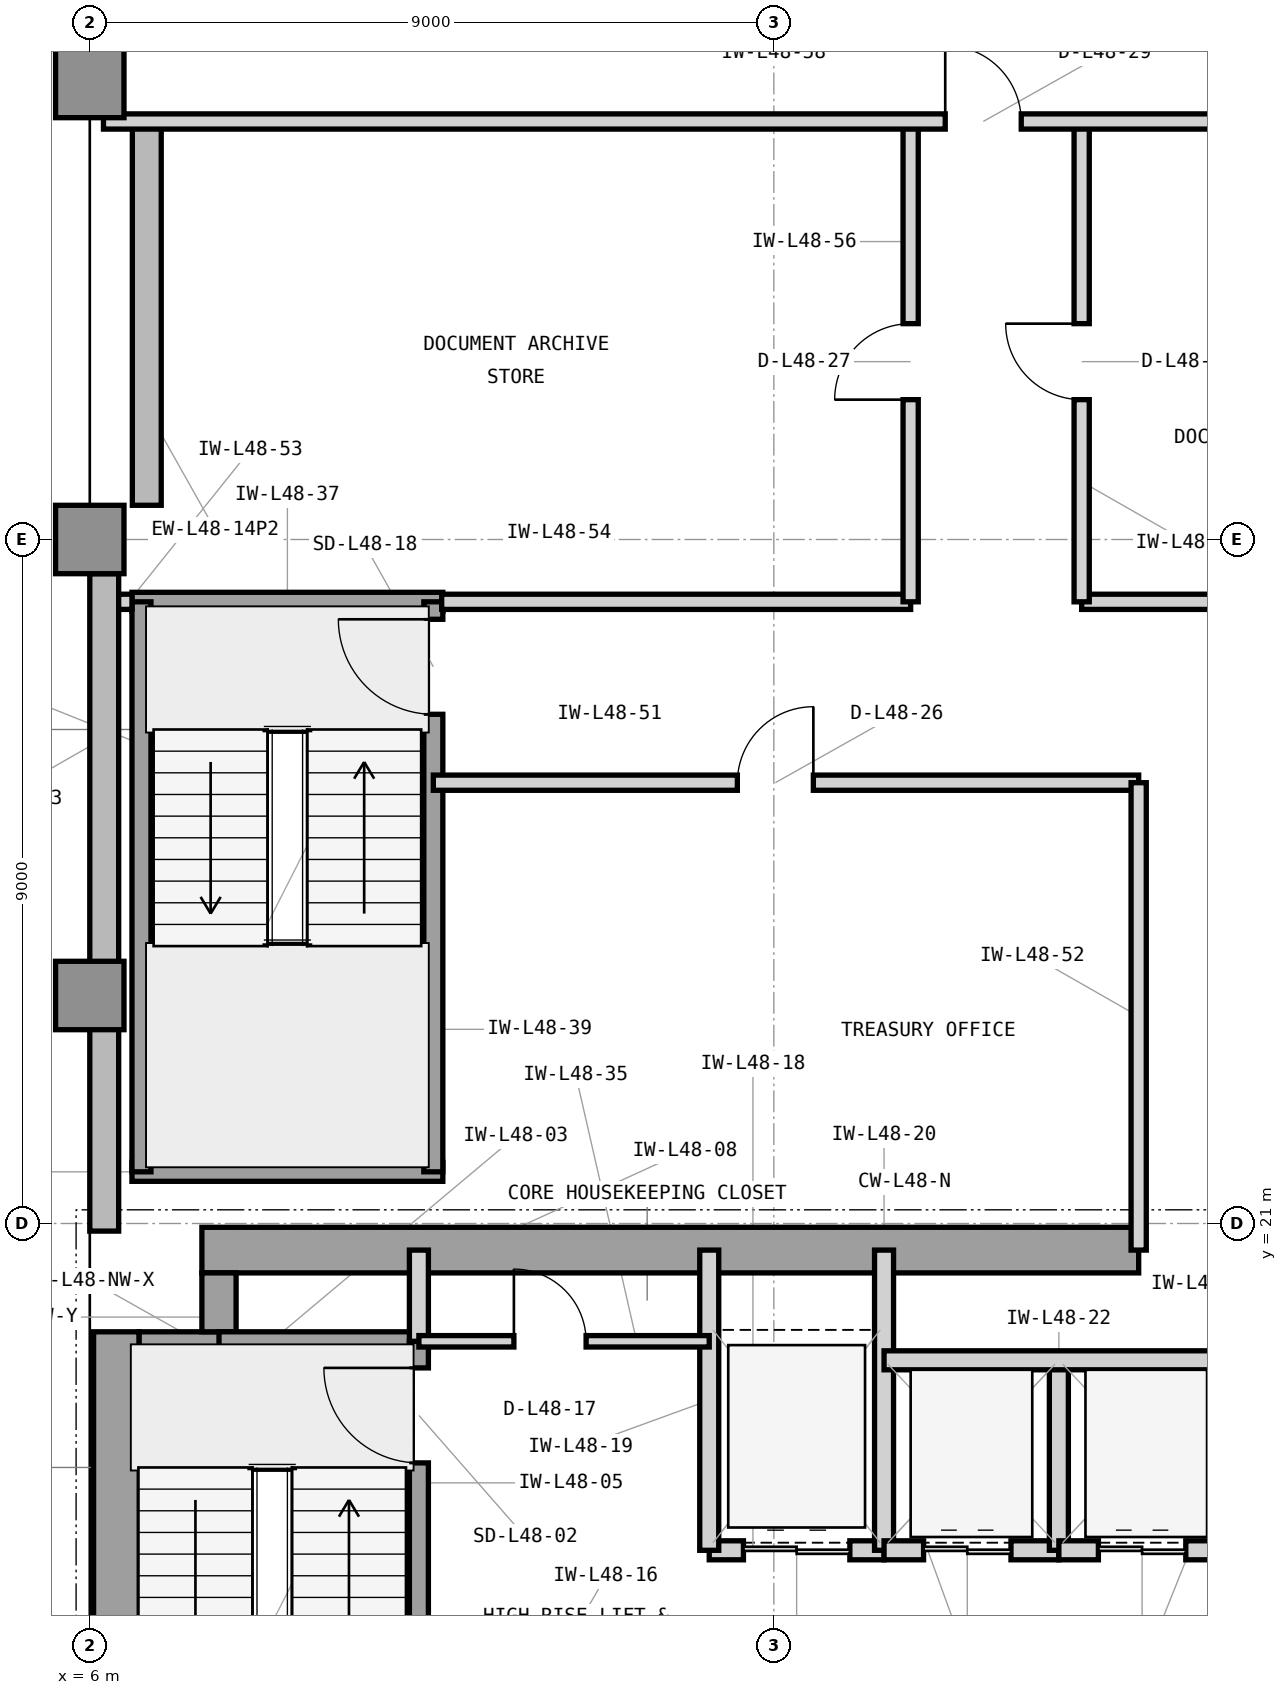
"""IFC4 building model, lengths in metres.
Left out: names, types, materials, properties, quantities, classifications, styles, units other than length and angle.
Written with IfcOpenShell. Run it as: python <this file> out.ifc"""

import sys

from ifc_helpers import new_model, si_unit, direction, frame, frame_2d, origin, origin_2d, place, context, subcontext, project, spatial, rectangle, extrude, element, fill, save


model = new_model("IFC4")
c1 = context("Model", 3, precision=1e-05, world=origin(), true_north=direction((0.0, 1.0)))
c2 = subcontext(c1, "Body", "Model", "MODEL_VIEW")
j1 = project(units=[si_unit("LENGTHUNIT", "METRE"), si_unit("PLANEANGLEUNIT", "RADIAN")], contexts=[c1])
p1 = place(None, origin())
s1 = spatial("IfcSite", under=j1, at=p1, CompositionType="ELEMENT")
p2 = place(p1, origin())
s2 = spatial("IfcBuilding", under=s1, at=p2, CompositionType="ELEMENT")
p3 = place(p2, frame((0.0, 0.0, 199.5)))
s3 = spatial("IfcBuildingStorey", under=s2, at=p3, CompositionType="ELEMENT", Elevation=199.5)
p4 = place(p3, frame((6.35, 4.425, 0.0), z_axis=(0.0, 0.0, 1.0), x_axis=(0.0, 1.0, 0.0)))
e1 = element("IfcWall", 1, at=p4, inside=s3, PredefinedType="SHEAR", context=c2, shape_type="SweptSolid", body=[
    extrude(rectangle(XDim=15.15, YDim=0.6, at=frame_2d((7.575, 0.0))), origin(), (0.0, 0.0, 1.0), 3.9),
])
p5 = place(p3, frame((7.475, 20.65, 0.0), z_axis=(0.0, 0.0, 1.0), x_axis=(1.0, 0.0, 0.0)))
e2 = element("IfcWall", 2, at=p5, inside=s3, PredefinedType="SHEAR", context=c2, shape_type="SweptSolid", body=[
    extrude(rectangle(XDim=12.325, YDim=0.6, at=frame_2d((6.163, 0.0))), origin(), (0.0, 0.0, 1.0), 3.9),
])
p6 = place(p3, frame((6.65, 19.35, 0.0), z_axis=(0.0, 0.0, 1.0), x_axis=(1.0, 0.0, 0.0)))
e3 = element("IfcWall", 3, at=p6, inside=s3, PredefinedType="SHEAR", context=c2, shape_type="SweptSolid", body=[
    extrude(rectangle(XDim=1.275, YDim=0.45, at=frame_2d((0.638, 0.0))), origin(), (0.0, 0.0, 1.0), 3.9),
])
p7 = place(p3, frame((7.7, 19.575, 0.0), z_axis=(0.0, 0.0, 1.0), x_axis=(0.0, 1.0, 0.0)))
e4 = element("IfcWall", 4, at=p7, inside=s3, PredefinedType="SHEAR", context=c2, shape_type="SweptSolid", body=[
    extrude(rectangle(XDim=0.775, YDim=0.45, at=frame_2d((0.388, 0.0))), origin(), (0.0, 0.0, 1.0), 3.9),
])
for number, where, z_axis, x_axis in (
    (5, (6.0, 24.0, 0.0), (0.0, 0.0, 1.0), (1.0, 0.0, 0.0)),
    (6, (6.0, 30.0, 0.0), (0.0, 0.0, 1.0), (1.0, 0.0, 0.0)),
    (7, (6.0, 36.0, 0.0), (0.0, 0.0, 1.0), (1.0, 0.0, 0.0)),
):
    element("IfcColumn", number, at=place(p3, frame(where, z_axis=z_axis, x_axis=x_axis)), inside=s3, PredefinedType="COLUMN", context=c2, shape_type="SweptSolid", body=[
        extrude(rectangle(XDim=0.9, YDim=0.9, at=origin_2d()), origin(), (0.0, 0.0, 1.0), 3.9),
    ])
p8 = place(p3, frame((6.75, 35.55, 0.0), z_axis=(0.0, 0.0, 1.0), x_axis=(0.0, -1.0, 0.0)))
e8 = element("IfcWall", 8, at=p8, inside=s3, PredefinedType="STANDARD", context=c2, shape_type="SweptSolid", body=[
    extrude(rectangle(XDim=5.1, YDim=0.38, at=frame_2d((2.55, 0.0))), origin(), (0.0, 0.0, 1.0), 3.7),
])
p9 = place(p3, frame((6.19, 29.55, 0.0), z_axis=(0.0, 0.0, 1.0), x_axis=(0.0, -1.0, 0.0)))
e9 = element("IfcWall", 9, at=p9, inside=s3, PredefinedType="STANDARD", context=c2, shape_type="SweptSolid", body=[
    extrude(rectangle(XDim=8.65, YDim=0.38, at=frame_2d((4.325, 0.0))), origin(), (0.0, 0.0, 1.0), 3.7),
])
p10 = place(p3, frame((7.7, 19.45, 0.0), z_axis=(0.0, 0.0, 1.0), x_axis=(1.0, 0.0, 0.0)))
e10 = element("IfcWall", 10, at=p10, inside=s3, PredefinedType="SHEAR", context=c2, shape_type="SweptSolid", body=[
    extrude(rectangle(XDim=2.755, YDim=0.25, at=frame_2d((1.377, 0.0))), origin(), (0.0, 0.0, 1.0), 3.9),
])
p11 = place(p3, frame((10.33, 12.0, 0.0), z_axis=(0.0, 0.0, 1.0), x_axis=(0.0, 1.0, 0.0)))
e11 = element("IfcWall", 11, at=p11, inside=s3, PredefinedType="SHEAR", context=c2, shape_type="SweptSolid", body=[
    extrude(rectangle(XDim=7.45, YDim=0.25, at=frame_2d((3.725, 0.0))), origin(), (0.0, 0.0, 1.0), 3.9),
])
p12 = place(p11, frame((5.85, 0.0, 0.0)))
e12 = element("IfcOpeningElement", 12, at=p12, cuts=e11, PredefinedType="OPENING", context=c2, shape_type="SweptSolid", body=[
    extrude(rectangle(XDim=1.25, YDim=2.2, at=frame_2d((0.625, 1.1))), frame((0.0, 0.135, 0.0), z_axis=(0.0, -1.0, 0.0), x_axis=(1.0, 0.0, 0.0)), (0.0, 0.0, 1.0), 0.27),
])
p13 = place(p3, frame((10.33, 19.45, 0.0), z_axis=(0.0, 0.0, 1.0), x_axis=(0.0, 1.0, 0.0)))
e13 = element("IfcWall", 13, at=p13, inside=s3, PredefinedType="PARTITIONING", context=c2, shape_type="SweptSolid", body=[
    extrude(rectangle(XDim=1.2, YDim=0.25, at=frame_2d((0.6, 0.0))), origin(), (0.0, 0.0, 1.0), 3.69),
])
p14 = place(p3, frame((14.15, 16.7, 0.0), z_axis=(0.0, 0.0, 1.0), x_axis=(1.0, 0.0, 0.0)))
e14 = element("IfcWall", 14, at=p14, inside=s3, PredefinedType="PARTITIONING", context=c2, shape_type="SweptSolid", body=[
    extrude(rectangle(XDim=2.3, YDim=0.25, at=frame_2d((1.15, 0.0))), origin(), (0.0, 0.0, 1.0), 3.283),
])
p15 = place(p14, frame((0.45, 0.0, 0.0)))
e15 = element("IfcOpeningElement", 15, at=p15, cuts=e14, PredefinedType="OPENING", context=c2, shape_type="SweptSolid", body=[
    extrude(rectangle(XDim=1.4, YDim=2.35, at=frame_2d((0.7, 1.175))), frame((0.0, 0.135, 0.0), z_axis=(0.0, -1.0, 0.0), x_axis=(1.0, 0.0, 0.0)), (0.0, 0.0, 1.0), 0.27),
])
for number, where, z_axis, x_axis in (
    (16, (14.15, 16.7, 0.0), (0.0, 0.0, 1.0), (0.0, 1.0, 0.0)),
    (17, (16.45, 16.7, 0.0), (0.0, 0.0, 1.0), (0.0, 1.0, 0.0)),
):
    element("IfcWall", number, at=place(p3, frame(where, z_axis=z_axis, x_axis=x_axis)), inside=s3, PredefinedType="PARTITIONING", context=c2, shape_type="SweptSolid", body=[
        extrude(rectangle(XDim=3.95, YDim=0.25, at=frame_2d((1.975, 0.0))), origin(), (0.0, 0.0, 1.0), 3.69),
    ])
p16 = place(p3, frame((16.45, 16.7, 0.0), z_axis=(0.0, 0.0, 1.0), x_axis=(1.0, 0.0, 0.0)))
e18 = element("IfcWall", 18, at=p16, inside=s3, PredefinedType="PARTITIONING", context=c2, shape_type="SweptSolid", body=[
    extrude(rectangle(XDim=2.3, YDim=0.25, at=frame_2d((1.15, 0.0))), origin(), (0.0, 0.0, 1.0), 3.283),
])
p17 = place(p16, frame((0.52, 0.0, 0.0)))
e19 = element("IfcOpeningElement", 19, at=p17, cuts=e18, PredefinedType="OPENING", context=c2, shape_type="SweptSolid", body=[
    extrude(rectangle(XDim=1.15, YDim=2.25, at=frame_2d((0.575, 1.125))), frame((0.0, 0.135, 0.0), z_axis=(0.0, -1.0, 0.0), x_axis=(1.0, 0.0, 0.0)), (0.0, 0.0, 1.0), 0.27),
])
p18 = place(p3, frame((18.75, 16.7, 0.0), z_axis=(0.0, 0.0, 1.0), x_axis=(0.0, 1.0, 0.0)))
e20 = element("IfcWall", 20, at=p18, inside=s3, PredefinedType="PARTITIONING", context=c2, shape_type="SweptSolid", body=[
    extrude(rectangle(XDim=2.5, YDim=0.25, at=frame_2d((1.25, 0.0))), origin(), (0.0, 0.0, 1.0), 3.69),
])
p19 = place(p3, frame((18.75, 16.7, 0.0), z_axis=(0.0, 0.0, 1.0), x_axis=(1.0, 0.0, 0.0)))
e21 = element("IfcWall", 21, at=p19, inside=s3, PredefinedType="PARTITIONING", context=c2, shape_type="SweptSolid", body=[
    extrude(rectangle(XDim=2.3, YDim=0.25, at=frame_2d((1.15, 0.0))), origin(), (0.0, 0.0, 1.0), 3.283),
])
p20 = place(p19, frame((0.52, 0.0, 0.0)))
e22 = element("IfcOpeningElement", 22, at=p20, cuts=e21, PredefinedType="OPENING", context=c2, shape_type="SweptSolid", body=[
    extrude(rectangle(XDim=1.15, YDim=2.25, at=frame_2d((0.575, 1.125))), frame((0.0, 0.135, 0.0), z_axis=(0.0, -1.0, 0.0), x_axis=(1.0, 0.0, 0.0)), (0.0, 0.0, 1.0), 0.27),
])
p21 = place(p3, frame((16.45, 19.2, 0.0), z_axis=(0.0, 0.0, 1.0), x_axis=(1.0, 0.0, 0.0)))
e23 = element("IfcWall", 23, at=p21, inside=s3, PredefinedType="PARTITIONING", context=c2, shape_type="SweptSolid", body=[
    extrude(rectangle(XDim=7.2, YDim=0.25, at=frame_2d((3.6, 0.0))), origin(), (0.0, 0.0, 1.0), 3.69),
])
p22 = place(p3, frame((10.33, 19.45, 0.0), z_axis=(0.0, 0.0, 1.0), x_axis=(1.0, 0.0, 0.0)))
e24 = element("IfcWall", 24, at=p22, inside=s3, PredefinedType="PARTITIONING", context=c2, shape_type="SweptSolid", body=[
    extrude(rectangle(XDim=3.82, YDim=0.15, at=frame_2d((1.91, 0.0))), origin(), (0.0, 0.0, 1.0), 3.69),
])
p23 = place(p22, frame((1.25, 0.0, 0.0)))
e25 = element("IfcOpeningElement", 25, at=p23, cuts=e24, PredefinedType="OPENING", context=c2, shape_type="SweptSolid", body=[
    extrude(rectangle(XDim=0.95, YDim=2.1, at=frame_2d((0.475, 1.05))), frame((0.0, 0.085, 0.0), z_axis=(0.0, -1.0, 0.0), x_axis=(1.0, 0.0, 0.0)), (0.0, 0.0, 1.0), 0.17),
])
for number, where, z_axis, x_axis in (
    (26, (6.555, 21.68, 0.0), (0.0, 0.0, 1.0), (1.0, 0.0, 0.0)),
    (27, (6.555, 29.18, 0.0), (0.0, 0.0, 1.0), (1.0, 0.0, 0.0)),
):
    element("IfcWall", number, at=place(p3, frame(where, z_axis=z_axis, x_axis=x_axis)), inside=s3, PredefinedType="SHEAR", context=c2, shape_type="SweptSolid", body=[
        extrude(rectangle(XDim=4.09, YDim=0.25, at=frame_2d((2.045, 0.0))), origin(), (0.0, 0.0, 1.0), 3.9),
    ])
p24 = place(p3, frame((6.68, 21.68, 0.0), z_axis=(0.0, 0.0, 1.0), x_axis=(0.0, 1.0, 0.0)))
e28 = element("IfcWall", 28, at=p24, inside=s3, PredefinedType="SHEAR", context=c2, shape_type="SweptSolid", body=[
    extrude(rectangle(XDim=7.5, YDim=0.25, at=frame_2d((3.75, 0.0))), origin(), (0.0, 0.0, 1.0), 3.9),
])
p25 = place(p3, frame((10.52, 21.68, 0.0), z_axis=(0.0, 0.0, 1.0), x_axis=(0.0, 1.0, 0.0)))
e29 = element("IfcWall", 29, at=p25, inside=s3, PredefinedType="SHEAR", context=c2, shape_type="SweptSolid", body=[
    extrude(rectangle(XDim=7.5, YDim=0.25, at=frame_2d((3.75, 0.0))), origin(), (0.0, 0.0, 1.0), 3.9),
])
p26 = place(p25, frame((6.02, 0.0, 0.0)))
e30 = element("IfcOpeningElement", 30, at=p26, cuts=e29, PredefinedType="OPENING", context=c2, shape_type="SweptSolid", body=[
    extrude(rectangle(XDim=1.25, YDim=2.2, at=frame_2d((0.625, 1.1))), frame((0.0, 0.135, 0.0), z_axis=(0.0, -1.0, 0.0), x_axis=(1.0, 0.0, 0.0)), (0.0, 0.0, 1.0), 0.27),
])
p27 = place(p3, frame((10.52, 26.8, 0.0), z_axis=(0.0, 0.0, 1.0), x_axis=(1.0, 0.0, 0.0)))
e31 = element("IfcWall", 31, at=p27, inside=s3, PredefinedType="PARTITIONING", context=c2, shape_type="SweptSolid", body=[
    extrude(rectangle(XDim=9.28, YDim=0.2, at=frame_2d((4.64, 0.0))), origin(), (0.0, 0.0, 1.0), 3.69),
])
p28 = place(p27, frame((4.0, 0.0, 0.0)))
e32 = element("IfcOpeningElement", 32, at=p28, cuts=e31, PredefinedType="OPENING", context=c2, shape_type="SweptSolid", body=[
    extrude(rectangle(XDim=1.0, YDim=2.15, at=frame_2d((0.5, 1.075))), frame((0.0, 0.11, 0.0), z_axis=(0.0, -1.0, 0.0), x_axis=(1.0, 0.0, 0.0)), (0.0, 0.0, 1.0), 0.22),
])
p29 = place(p3, frame((19.8, 20.65, 0.0), z_axis=(0.0, 0.0, 1.0), x_axis=(0.0, 1.0, 0.0)))
e33 = element("IfcWall", 33, at=p29, inside=s3, PredefinedType="PARTITIONING", context=c2, shape_type="SweptSolid", body=[
    extrude(rectangle(XDim=6.15, YDim=0.2, at=frame_2d((3.075, 0.0))), origin(), (0.0, 0.0, 1.0), 3.69),
])
p30 = place(p3, frame((6.38, 29.18, 0.0), z_axis=(0.0, 0.0, 1.0), x_axis=(1.0, 0.0, 0.0)))
e34 = element("IfcWall", 34, at=p30, inside=s3, PredefinedType="PARTITIONING", context=c2, shape_type="SweptSolid", body=[
    extrude(rectangle(XDim=0.175, YDim=0.2, at=frame_2d((0.087, 0.0))), origin(), (0.0, 0.0, 1.0), 3.69),
])
p31 = place(p3, frame((10.63, 29.18, 0.0), z_axis=(0.0, 0.0, 1.0), x_axis=(1.0, 0.0, 0.0)))
e35 = element("IfcWall", 35, at=p31, inside=s3, PredefinedType="PARTITIONING", context=c2, shape_type="SweptSolid", body=[
    extrude(rectangle(XDim=6.17, YDim=0.2, at=frame_2d((3.085, 0.0))), origin(), (0.0, 0.0, 1.0), 3.69),
])
p32 = place(p3, frame((19.05, 29.18, 0.0), z_axis=(0.0, 0.0, 1.0), x_axis=(1.0, 0.0, 0.0)))
e36 = element("IfcWall", 36, at=p32, inside=s3, PredefinedType="PARTITIONING", context=c2, shape_type="SweptSolid", body=[
    extrude(rectangle(XDim=4.77, YDim=0.2, at=frame_2d((2.385, 0.0))), origin(), (0.0, 0.0, 1.0), 3.69),
])
p33 = place(p3, frame((16.8, 29.18, 0.0), z_axis=(0.0, 0.0, 1.0), x_axis=(0.0, 1.0, 0.0)))
e37 = element("IfcWall", 37, at=p33, inside=s3, PredefinedType="PARTITIONING", context=c2, shape_type="SweptSolid", body=[
    extrude(rectangle(XDim=6.32, YDim=0.2, at=frame_2d((3.16, 0.0))), origin(), (0.0, 0.0, 1.0), 3.69),
])
p34 = place(p33, frame((2.66, 0.0, 0.0)))
e38 = element("IfcOpeningElement", 38, at=p34, cuts=e37, PredefinedType="OPENING", context=c2, shape_type="SweptSolid", body=[
    extrude(rectangle(XDim=1.0, YDim=2.15, at=frame_2d((0.5, 1.075))), frame((0.0, 0.11, 0.0), z_axis=(0.0, -1.0, 0.0), x_axis=(1.0, 0.0, 0.0)), (0.0, 0.0, 1.0), 0.22),
])
p35 = place(p3, frame((19.05, 29.18, 0.0), z_axis=(0.0, 0.0, 1.0), x_axis=(0.0, 1.0, 0.0)))
e39 = element("IfcWall", 39, at=p35, inside=s3, PredefinedType="PARTITIONING", context=c2, shape_type="SweptSolid", body=[
    extrude(rectangle(XDim=6.32, YDim=0.2, at=frame_2d((3.16, 0.0))), origin(), (0.0, 0.0, 1.0), 3.69),
])
p36 = place(p35, frame((2.66, 0.0, 0.0)))
e40 = element("IfcOpeningElement", 40, at=p36, cuts=e39, PredefinedType="OPENING", context=c2, shape_type="SweptSolid", body=[
    extrude(rectangle(XDim=1.0, YDim=2.15, at=frame_2d((0.5, 1.075))), frame((0.0, 0.11, 0.0), z_axis=(0.0, -1.0, 0.0), x_axis=(1.0, 0.0, 0.0)), (0.0, 0.0, 1.0), 0.22),
])
p37 = place(p3, frame((6.18, 35.5, 0.0), z_axis=(0.0, 0.0, 1.0), x_axis=(1.0, 0.0, 0.0)))
e41 = element("IfcWall", 41, at=p37, inside=s3, PredefinedType="PARTITIONING", context=c2, shape_type="SweptSolid", body=[
    extrude(rectangle(XDim=17.64, YDim=0.2, at=frame_2d((8.82, 0.0))), origin(), (0.0, 0.0, 1.0), 3.69),
])
p38 = place(p37, frame((11.075, 0.0, 0.0)))
e42 = element("IfcOpeningElement", 42, at=p38, cuts=e41, PredefinedType="OPENING", context=c2, shape_type="SweptSolid", body=[
    extrude(rectangle(XDim=1.0, YDim=2.15, at=frame_2d((0.5, 1.075))), frame((0.0, 0.11, 0.0), z_axis=(0.0, -1.0, 0.0), x_axis=(1.0, 0.0, 0.0)), (0.0, 0.0, 1.0), 0.22),
])
p39 = place(p12, origin())
e43 = element("IfcDoor", 43, at=p39, inside=s3, OperationType="SINGLE_SWING_RIGHT", PredefinedType="DOOR", context=c2, shape_type="SweptSolid", body=[
    extrude(rectangle(XDim=1.25, YDim=2.2, at=frame_2d((0.625, 1.1))), frame((0.0, 0.025, 0.0), z_axis=(0.0, -1.0, 0.0), x_axis=(1.0, 0.0, 0.0)), (0.0, 0.0, 1.0), 0.05),
])
fill(e12, e43)
p40 = place(p15, origin())
e44 = element("IfcDoor", 44, at=p40, inside=s3, OperationType="DOUBLE_DOOR_SLIDING", PredefinedType="DOOR", context=c2, shape_type="SweptSolid", body=[
    extrude(rectangle(XDim=1.4, YDim=2.35, at=frame_2d((0.7, 1.175))), frame((0.0, 0.025, 0.0), z_axis=(0.0, -1.0, 0.0), x_axis=(1.0, 0.0, 0.0)), (0.0, 0.0, 1.0), 0.05),
])
fill(e15, e44)
p41 = place(p17, origin())
e45 = element("IfcDoor", 45, at=p41, inside=s3, OperationType="DOUBLE_DOOR_SLIDING", PredefinedType="DOOR", context=c2, shape_type="SweptSolid", body=[
    extrude(rectangle(XDim=1.15, YDim=2.25, at=frame_2d((0.575, 1.125))), frame((0.0, 0.025, 0.0), z_axis=(0.0, -1.0, 0.0), x_axis=(1.0, 0.0, 0.0)), (0.0, 0.0, 1.0), 0.05),
])
fill(e19, e45)
p42 = place(p20, origin())
e46 = element("IfcDoor", 46, at=p42, inside=s3, OperationType="DOUBLE_DOOR_SLIDING", PredefinedType="DOOR", context=c2, shape_type="SweptSolid", body=[
    extrude(rectangle(XDim=1.15, YDim=2.25, at=frame_2d((0.575, 1.125))), frame((0.0, 0.025, 0.0), z_axis=(0.0, -1.0, 0.0), x_axis=(1.0, 0.0, 0.0)), (0.0, 0.0, 1.0), 0.05),
])
fill(e22, e46)
p43 = place(p23, origin())
e47 = element("IfcDoor", 47, at=p43, inside=s3, OperationType="SINGLE_SWING_LEFT", PredefinedType="DOOR", context=c2, shape_type="SweptSolid", body=[
    extrude(rectangle(XDim=0.95, YDim=2.1, at=frame_2d((0.475, 1.05))), frame((0.0, 0.025, 0.0), z_axis=(0.0, -1.0, 0.0), x_axis=(1.0, 0.0, 0.0)), (0.0, 0.0, 1.0), 0.05),
])
fill(e25, e47)
p44 = place(p26, origin())
e48 = element("IfcDoor", 48, at=p44, inside=s3, OperationType="SINGLE_SWING_RIGHT", PredefinedType="DOOR", context=c2, shape_type="SweptSolid", body=[
    extrude(rectangle(XDim=1.25, YDim=2.2, at=frame_2d((0.625, 1.1))), frame((0.0, 0.025, 0.0), z_axis=(0.0, -1.0, 0.0), x_axis=(1.0, 0.0, 0.0)), (0.0, 0.0, 1.0), 0.05),
])
fill(e30, e48)
p45 = place(p28, origin())
e49 = element("IfcDoor", 49, at=p45, inside=s3, OperationType="SINGLE_SWING_RIGHT", PredefinedType="DOOR", context=c2, shape_type="SweptSolid", body=[
    extrude(rectangle(XDim=1.0, YDim=2.15, at=frame_2d((0.5, 1.075))), frame((0.0, 0.025, 0.0), z_axis=(0.0, -1.0, 0.0), x_axis=(1.0, 0.0, 0.0)), (0.0, 0.0, 1.0), 0.05),
])
fill(e32, e49)
p46 = place(p34, origin())
e50 = element("IfcDoor", 50, at=p46, inside=s3, OperationType="SINGLE_SWING_LEFT", PredefinedType="DOOR", context=c2, shape_type="SweptSolid", body=[
    extrude(rectangle(XDim=1.0, YDim=2.15, at=frame_2d((0.5, 1.075))), frame((0.0, 0.025, 0.0), z_axis=(0.0, -1.0, 0.0), x_axis=(1.0, 0.0, 0.0)), (0.0, 0.0, 1.0), 0.05),
])
fill(e38, e50)
p47 = place(p36, origin())
e51 = element("IfcDoor", 51, at=p47, inside=s3, OperationType="SINGLE_SWING_RIGHT", PredefinedType="DOOR", context=c2, shape_type="SweptSolid", body=[
    extrude(rectangle(XDim=1.0, YDim=2.15, at=frame_2d((0.5, 1.075))), frame((0.0, 0.025, 0.0), z_axis=(0.0, -1.0, 0.0), x_axis=(1.0, 0.0, 0.0)), (0.0, 0.0, 1.0), 0.05),
])
fill(e40, e51)
p48 = place(p38, origin())
e52 = element("IfcDoor", 52, at=p48, inside=s3, OperationType="SINGLE_SWING_LEFT", PredefinedType="DOOR", context=c2, shape_type="SweptSolid", body=[
    extrude(rectangle(XDim=1.0, YDim=2.15, at=frame_2d((0.5, 1.075))), frame((0.0, 0.025, 0.0), z_axis=(0.0, -1.0, 0.0), x_axis=(1.0, 0.0, 0.0)), (0.0, 0.0, 1.0), 0.05),
])
fill(e42, e52)
save(model, sys.argv[1])
